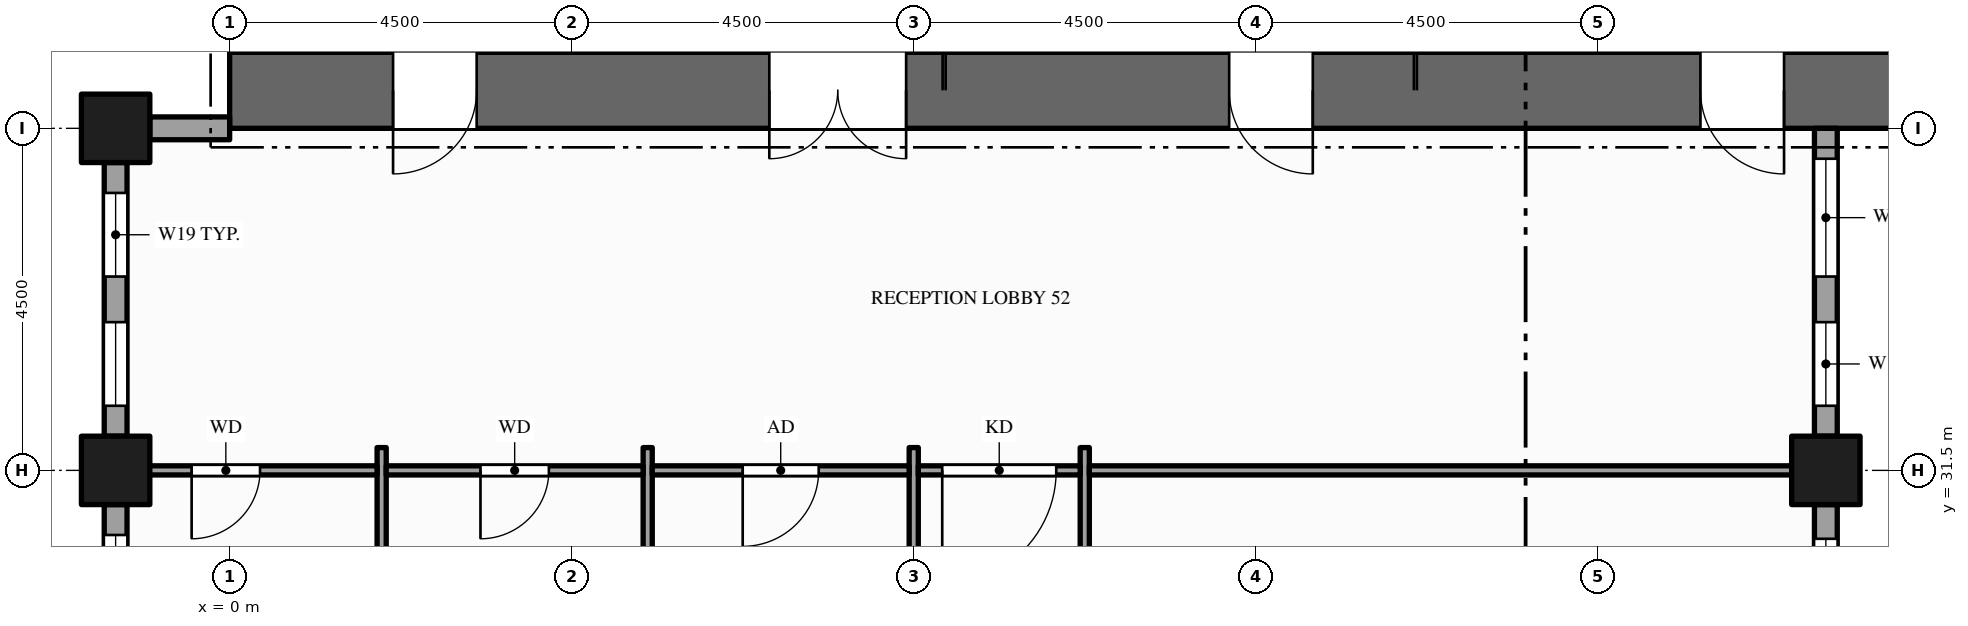
"""IFC4 building model, lengths in metres.
Left out: names, types, materials, properties, quantities, classifications, styles, units other than length and angle.
Written with IfcOpenShell. Run it as: python <this file> out.ifc"""

import sys

from ifc_helpers import new_model, si_unit, direction, frame, frame_2d, origin, origin_2d, place, context, subcontext, project, spatial, rectangle, hollow_rectangle, extrude, element, fill, save


model = new_model("IFC4")
c1 = context("Model", 3, precision=1e-05, world=origin(), true_north=direction((0.0, 1.0)))
c2 = subcontext(c1, "Body", "Model", "MODEL_VIEW")
j1 = project(units=[si_unit("LENGTHUNIT", "METRE"), si_unit("PLANEANGLEUNIT", "RADIAN")], contexts=[c1])
p1 = place(None, origin())
s1 = spatial("IfcSite", under=j1, at=p1, CompositionType="ELEMENT")
p2 = place(p1, origin())
s2 = spatial("IfcBuilding", under=s1, at=p2, CompositionType="ELEMENT")
p3 = place(p2, frame((0.0, 0.0, 139.0)))
s3 = spatial("IfcBuildingStorey", under=s2, at=p3, CompositionType="ELEMENT", Elevation=139.0)
p4 = place(p3, frame((0.0, 36.5, -0.15), z_axis=(0.0, 0.0, 1.0), x_axis=(1.0, 0.0, 0.0)))
e1 = element("IfcWall", 1, at=p4, inside=s3, PredefinedType="SHEAR", context=c2, shape_type="SweptSolid", body=[
    extrude(rectangle(XDim=22.5, YDim=1.0, at=frame_2d((11.25, 0.0))), origin(), (0.0, 0.0, 1.0), 4.0),
])
p5 = place(p4, frame((7.1, 0.0, 0.15)))
e2 = element("IfcOpeningElement", 2, at=p5, cuts=e1, PredefinedType="OPENING", context=c2, shape_type="SweptSolid", body=[
    extrude(rectangle(XDim=1.8, YDim=2.1, at=frame_2d((0.9, 1.05))), frame((0.0, 0.51, 0.0), z_axis=(0.0, -1.0, 0.0), x_axis=(1.0, 0.0, 0.0)), (0.0, 0.0, 1.0), 1.02),
])
p6 = place(p4, frame((13.15, 0.0, 0.15)))
e3 = element("IfcOpeningElement", 3, at=p6, cuts=e1, PredefinedType="OPENING", context=c2, shape_type="SweptSolid", body=[
    extrude(rectangle(XDim=1.1, YDim=2.1, at=frame_2d((0.55, 1.05))), frame((0.0, 0.51, 0.0), z_axis=(0.0, -1.0, 0.0), x_axis=(1.0, 0.0, 0.0)), (0.0, 0.0, 1.0), 1.02),
])
p7 = place(p4, frame((2.15, 0.0, 0.15)))
e4 = element("IfcOpeningElement", 4, at=p7, cuts=e1, PredefinedType="OPENING", context=c2, shape_type="SweptSolid", body=[
    extrude(rectangle(XDim=1.1, YDim=2.1, at=frame_2d((0.55, 1.05))), frame((0.0, 0.51, 0.0), z_axis=(0.0, -1.0, 0.0), x_axis=(1.0, 0.0, 0.0)), (0.0, 0.0, 1.0), 1.02),
])
p8 = place(p4, frame((19.35, 0.0, 0.15)))
e5 = element("IfcOpeningElement", 5, at=p8, cuts=e1, PredefinedType="OPENING", context=c2, shape_type="SweptSolid", body=[
    extrude(rectangle(XDim=1.1, YDim=2.1, at=frame_2d((0.55, 1.05))), frame((0.0, 0.51, 0.0), z_axis=(0.0, -1.0, 0.0), x_axis=(1.0, 0.0, 0.0)), (0.0, 0.0, 1.0), 1.02),
])
for number, where, z_axis, x_axis in (
    (6, (-1.5, 31.5, -0.15), (0.0, 0.0, 1.0), (1.0, 0.0, 0.0)),
    (7, (-1.5, 36.0, -0.15), (0.0, 0.0, 1.0), (1.0, 0.0, 0.0)),
    (8, (21.0, 31.5, -0.15), (0.0, 0.0, 1.0), (1.0, 0.0, 0.0)),
):
    element("IfcColumn", number, at=place(p3, frame(where, z_axis=z_axis, x_axis=x_axis)), inside=s3, PredefinedType="COLUMN", context=c2, shape_type="SweptSolid", body=[
        extrude(hollow_rectangle(XDim=0.9, YDim=0.9, WallThickness=0.045, at=origin_2d()), origin(), (0.0, 0.0, 1.0), 4.0),
    ])
p9 = place(p3, frame((21.0, 28.95, 0.0), z_axis=(0.0, 0.0, 1.0), x_axis=(0.0, 1.0, 0.0)))
e9 = element("IfcWall", 9, at=p9, inside=s3, PredefinedType="STANDARD", context=c2, shape_type="SweptSolid", body=[
    extrude(rectangle(XDim=2.1, YDim=0.3, at=frame_2d((1.05, 0.0))), origin(), (0.0, 0.0, 1.0), 3.149),
])
p10 = place(p9, frame((0.45, 0.0, 0.9)))
e10 = element("IfcOpeningElement", 10, at=p10, cuts=e9, PredefinedType="OPENING", context=c2, shape_type="SweptSolid", body=[
    extrude(rectangle(XDim=1.2, YDim=2.0, at=frame_2d((0.6, 1.0))), frame((0.0, 0.16, 0.0), z_axis=(0.0, -1.0, 0.0), x_axis=(1.0, 0.0, 0.0)), (0.0, 0.0, 1.0), 0.32),
])
p11 = place(p3, frame((21.0, 31.95, 0.0), z_axis=(0.0, 0.0, 1.0), x_axis=(0.0, 1.0, 0.0)))
e11 = element("IfcWall", 11, at=p11, inside=s3, PredefinedType="STANDARD", context=c2, shape_type="SweptSolid", body=[
    extrude(rectangle(XDim=4.05, YDim=0.3, at=frame_2d((2.025, 0.0))), origin(), (0.0, 0.0, 1.0), 3.149),
])
p12 = place(p11, frame((0.4, 0.0, 0.9)))
e12 = element("IfcOpeningElement", 12, at=p12, cuts=e11, PredefinedType="OPENING", context=c2, shape_type="SweptSolid", body=[
    extrude(rectangle(XDim=1.1, YDim=2.0, at=frame_2d((0.55, 1.0))), frame((0.0, 0.16, 0.0), z_axis=(0.0, -1.0, 0.0), x_axis=(1.0, 0.0, 0.0)), (0.0, 0.0, 1.0), 0.32),
])
p13 = place(p11, frame((2.1, 0.0, 0.9)))
e13 = element("IfcOpeningElement", 13, at=p13, cuts=e11, PredefinedType="OPENING", context=c2, shape_type="SweptSolid", body=[
    extrude(rectangle(XDim=1.55, YDim=2.0, at=frame_2d((0.775, 1.0))), frame((0.0, 0.16, 0.0), z_axis=(0.0, -1.0, 0.0), x_axis=(1.0, 0.0, 0.0)), (0.0, 0.0, 1.0), 0.32),
])
p14 = place(p3, frame((0.0, 36.0, 0.0), z_axis=(0.0, 0.0, 1.0), x_axis=(-1.0, 0.0, 0.0)))
e14 = element("IfcWall", 14, at=p14, inside=s3, PredefinedType="STANDARD", context=c2, shape_type="SweptSolid", body=[
    extrude(rectangle(XDim=1.05, YDim=0.3, at=frame_2d((0.525, 0.0))), origin(), (0.0, 0.0, 1.0), 2.87),
])
p15 = place(p3, frame((-1.5, 35.55, 0.0), z_axis=(0.0, 0.0, 1.0), x_axis=(0.0, -1.0, 0.0)))
e15 = element("IfcWall", 15, at=p15, inside=s3, PredefinedType="STANDARD", context=c2, shape_type="SweptSolid", body=[
    extrude(rectangle(XDim=3.6, YDim=0.3, at=frame_2d((1.8, 0.0))), origin(), (0.0, 0.0, 1.0), 3.149),
])
p16 = place(p15, frame((0.4, 0.0, 0.9)))
e16 = element("IfcOpeningElement", 16, at=p16, cuts=e15, PredefinedType="OPENING", context=c2, shape_type="SweptSolid", body=[
    extrude(rectangle(XDim=1.1, YDim=2.0, at=frame_2d((0.55, 1.0))), frame((0.0, 0.16, 0.0), z_axis=(0.0, -1.0, 0.0), x_axis=(1.0, 0.0, 0.0)), (0.0, 0.0, 1.0), 0.32),
])
p17 = place(p15, frame((2.1, 0.0, 0.9)))
e17 = element("IfcOpeningElement", 17, at=p17, cuts=e15, PredefinedType="OPENING", context=c2, shape_type="SweptSolid", body=[
    extrude(rectangle(XDim=1.1, YDim=2.0, at=frame_2d((0.55, 1.0))), frame((0.0, 0.16, 0.0), z_axis=(0.0, -1.0, 0.0), x_axis=(1.0, 0.0, 0.0)), (0.0, 0.0, 1.0), 0.32),
])
p18 = place(p3, frame((-1.5, 31.05, 0.0), z_axis=(0.0, 0.0, 1.0), x_axis=(0.0, -1.0, 0.0)))
e18 = element("IfcWall", 18, at=p18, inside=s3, PredefinedType="STANDARD", context=c2, shape_type="SweptSolid", body=[
    extrude(rectangle(XDim=3.6, YDim=0.3, at=frame_2d((1.8, 0.0))), origin(), (0.0, 0.0, 1.0), 3.149),
])
p19 = place(p18, frame((0.4, 0.0, 0.9)))
e19 = element("IfcOpeningElement", 19, at=p19, cuts=e18, PredefinedType="OPENING", context=c2, shape_type="SweptSolid", body=[
    extrude(rectangle(XDim=1.1, YDim=2.0, at=frame_2d((0.55, 1.0))), frame((0.0, 0.16, 0.0), z_axis=(0.0, -1.0, 0.0), x_axis=(1.0, 0.0, 0.0)), (0.0, 0.0, 1.0), 0.32),
])
p20 = place(p18, frame((2.1, 0.0, 0.9)))
e20 = element("IfcOpeningElement", 20, at=p20, cuts=e18, PredefinedType="OPENING", context=c2, shape_type="SweptSolid", body=[
    extrude(rectangle(XDim=1.1, YDim=2.0, at=frame_2d((0.55, 1.0))), frame((0.0, 0.16, 0.0), z_axis=(0.0, -1.0, 0.0), x_axis=(1.0, 0.0, 0.0)), (0.0, 0.0, 1.0), 0.32),
])
for number, where, z_axis, x_axis in (
    (21, (2.0, 26.7, 0.0), (0.0, 0.0, 1.0), (0.0, 1.0, 0.0)),
    (22, (5.5, 26.7, 0.0), (0.0, 0.0, 1.0), (0.0, 1.0, 0.0)),
):
    element("IfcWall", number, at=place(p3, frame(where, z_axis=z_axis, x_axis=x_axis)), inside=s3, PredefinedType="PARTITIONING", context=c2, shape_type="SweptSolid", body=[
        extrude(rectangle(XDim=5.1, YDim=0.12, at=frame_2d((2.55, 0.0))), origin(), (0.0, 0.0, 1.0), 3.85),
    ])
p21 = place(p3, frame((9.0, 10.95, 0.0), z_axis=(0.0, 0.0, 1.0), x_axis=(0.0, 1.0, 0.0)))
e23 = element("IfcWall", 23, at=p21, inside=s3, PredefinedType="PARTITIONING", context=c2, shape_type="SweptSolid", body=[
    extrude(rectangle(XDim=20.85, YDim=0.12, at=frame_2d((10.425, 0.0))), origin(), (0.0, 0.0, 1.0), 2.6),
])
p22 = place(p21, frame((2.05, 0.0, 0.0)))
e24 = element("IfcOpeningElement", 24, at=p22, cuts=e23, PredefinedType="OPENING", context=c2, shape_type="SweptSolid", body=[
    extrude(rectangle(XDim=1.0, YDim=2.1, at=frame_2d((0.5, 1.05))), frame((0.0, 0.07, 0.0), z_axis=(0.0, -1.0, 0.0), x_axis=(1.0, 0.0, 0.0)), (0.0, 0.0, 1.0), 0.14),
])
p23 = place(p21, frame((6.55, 0.0, 0.0)))
e25 = element("IfcOpeningElement", 25, at=p23, cuts=e23, PredefinedType="OPENING", context=c2, shape_type="SweptSolid", body=[
    extrude(rectangle(XDim=1.0, YDim=2.1, at=frame_2d((0.5, 1.05))), frame((0.0, 0.07, 0.0), z_axis=(0.0, -1.0, 0.0), x_axis=(1.0, 0.0, 0.0)), (0.0, 0.0, 1.0), 0.14),
])
p24 = place(p21, frame((11.805, 0.0, 0.0)))
e26 = element("IfcOpeningElement", 26, at=p24, cuts=e23, PredefinedType="OPENING", context=c2, shape_type="SweptSolid", body=[
    extrude(rectangle(XDim=1.8, YDim=2.1, at=frame_2d((0.9, 1.05))), frame((0.0, 0.07, 0.0), z_axis=(0.0, -1.0, 0.0), x_axis=(1.0, 0.0, 0.0)), (0.0, 0.0, 1.0), 0.14),
])
p25 = place(p3, frame((11.25, 10.95, 0.0), z_axis=(0.0, 0.0, 1.0), x_axis=(0.0, 1.0, 0.0)))
e27 = element("IfcWall", 27, at=p25, inside=s3, PredefinedType="PARTITIONING", context=c2, shape_type="SweptSolid", body=[
    extrude(rectangle(XDim=20.85, YDim=0.12, at=frame_2d((10.425, 0.0))), origin(), (0.0, 0.0, 1.0), 2.6),
])
p26 = place(p25, frame((17.8, 0.0, 0.0)))
e28 = element("IfcOpeningElement", 28, at=p26, cuts=e27, PredefinedType="OPENING", context=c2, shape_type="SweptSolid", body=[
    extrude(rectangle(XDim=1.0, YDim=2.1, at=frame_2d((0.5, 1.05))), frame((0.0, 0.07, 0.0), z_axis=(0.0, -1.0, 0.0), x_axis=(1.0, 0.0, 0.0)), (0.0, 0.0, 1.0), 0.14),
])
p27 = place(p25, frame((4.2, 0.0, 0.0)))
e29 = element("IfcOpeningElement", 29, at=p27, cuts=e27, PredefinedType="OPENING", context=c2, shape_type="SweptSolid", body=[
    extrude(rectangle(XDim=1.2, YDim=2.1, at=frame_2d((0.6, 1.05))), frame((0.0, 0.07, 0.0), z_axis=(0.0, -1.0, 0.0), x_axis=(1.0, 0.0, 0.0)), (0.0, 0.0, 1.0), 0.14),
])
p28 = place(p3, frame((-1.35, 31.5, 0.0), z_axis=(0.0, 0.0, 1.0), x_axis=(1.0, 0.0, 0.0)))
e30 = element("IfcWall", 30, at=p28, inside=s3, PredefinedType="PARTITIONING", context=c2, shape_type="SweptSolid", body=[
    extrude(rectangle(XDim=3.29, YDim=0.12, at=frame_2d((1.645, 0.0))), origin(), (0.0, 0.0, 1.0), 2.87),
])
p29 = place(p28, frame((0.85, 0.0, 0.0)))
e31 = element("IfcOpeningElement", 31, at=p29, cuts=e30, PredefinedType="OPENING", context=c2, shape_type="SweptSolid", body=[
    extrude(rectangle(XDim=0.9, YDim=2.1, at=frame_2d((0.45, 1.05))), frame((0.0, 0.07, 0.0), z_axis=(0.0, -1.0, 0.0), x_axis=(1.0, 0.0, 0.0)), (0.0, 0.0, 1.0), 0.14),
])
p30 = place(p3, frame((2.06, 31.5, 0.0), z_axis=(0.0, 0.0, 1.0), x_axis=(1.0, 0.0, 0.0)))
e32 = element("IfcWall", 32, at=p30, inside=s3, PredefinedType="PARTITIONING", context=c2, shape_type="SweptSolid", body=[
    extrude(rectangle(XDim=3.38, YDim=0.12, at=frame_2d((1.69, 0.0))), origin(), (0.0, 0.0, 1.0), 2.87),
])
p31 = place(p30, frame((1.24, 0.0, 0.0)))
e33 = element("IfcOpeningElement", 33, at=p31, cuts=e32, PredefinedType="OPENING", context=c2, shape_type="SweptSolid", body=[
    extrude(rectangle(XDim=0.9, YDim=2.1, at=frame_2d((0.45, 1.05))), frame((0.0, 0.07, 0.0), z_axis=(0.0, -1.0, 0.0), x_axis=(1.0, 0.0, 0.0)), (0.0, 0.0, 1.0), 0.14),
])
p32 = place(p3, frame((5.56, 31.5, 0.0), z_axis=(0.0, 0.0, 1.0), x_axis=(1.0, 0.0, 0.0)))
e34 = element("IfcWall", 34, at=p32, inside=s3, PredefinedType="PARTITIONING", context=c2, shape_type="SweptSolid", body=[
    extrude(rectangle(XDim=3.38, YDim=0.12, at=frame_2d((1.69, 0.0))), origin(), (0.0, 0.0, 1.0), 2.87),
])
p33 = place(p32, frame((1.19, 0.0, 0.0)))
e35 = element("IfcOpeningElement", 35, at=p33, cuts=e34, PredefinedType="OPENING", context=c2, shape_type="SweptSolid", body=[
    extrude(rectangle(XDim=1.0, YDim=2.1, at=frame_2d((0.5, 1.05))), frame((0.0, 0.07, 0.0), z_axis=(0.0, -1.0, 0.0), x_axis=(1.0, 0.0, 0.0)), (0.0, 0.0, 1.0), 0.14),
])
p34 = place(p3, frame((9.06, 31.5, 0.0), z_axis=(0.0, 0.0, 1.0), x_axis=(1.0, 0.0, 0.0)))
e36 = element("IfcWall", 36, at=p34, inside=s3, PredefinedType="PARTITIONING", context=c2, shape_type="SweptSolid", body=[
    extrude(rectangle(XDim=2.13, YDim=0.12, at=frame_2d((1.065, 0.0))), origin(), (0.0, 0.0, 1.0), 2.87),
])
p35 = place(p34, frame((0.315, 0.0, 0.0)))
e37 = element("IfcOpeningElement", 37, at=p35, cuts=e36, PredefinedType="OPENING", context=c2, shape_type="SweptSolid", body=[
    extrude(rectangle(XDim=1.5, YDim=2.1, at=frame_2d((0.75, 1.05))), frame((0.0, 0.07, 0.0), z_axis=(0.0, -1.0, 0.0), x_axis=(1.0, 0.0, 0.0)), (0.0, 0.0, 1.0), 0.14),
])
p36 = place(p3, frame((11.31, 31.5, 0.0), z_axis=(0.0, 0.0, 1.0), x_axis=(1.0, 0.0, 0.0)))
e38 = element("IfcWall", 38, at=p36, inside=s3, PredefinedType="PARTITIONING", context=c2, shape_type="SweptSolid", body=[
    extrude(rectangle(XDim=9.54, YDim=0.12, at=frame_2d((4.77, 0.0))), origin(), (0.0, 0.0, 1.0), 2.87),
])
p37 = place(p10, origin())
e39 = element("IfcWindow", 39, at=p37, inside=s3, PartitioningType="SINGLE_PANEL", PredefinedType="WINDOW", context=c2, shape_type="SweptSolid", body=[
    extrude(rectangle(XDim=1.2, YDim=2.0, at=frame_2d((0.6, 1.0))), frame((0.0, 0.03, 0.0), z_axis=(0.0, -1.0, 0.0), x_axis=(1.0, 0.0, 0.0)), (0.0, 0.0, 1.0), 0.06),
])
fill(e10, e39)
p38 = place(p12, origin())
e40 = element("IfcWindow", 40, at=p38, inside=s3, PartitioningType="SINGLE_PANEL", PredefinedType="WINDOW", context=c2, shape_type="SweptSolid", body=[
    extrude(rectangle(XDim=1.1, YDim=2.0, at=frame_2d((0.55, 1.0))), frame((0.0, 0.03, 0.0), z_axis=(0.0, -1.0, 0.0), x_axis=(1.0, 0.0, 0.0)), (0.0, 0.0, 1.0), 0.06),
])
fill(e12, e40)
p39 = place(p13, origin())
e41 = element("IfcWindow", 41, at=p39, inside=s3, PartitioningType="SINGLE_PANEL", PredefinedType="WINDOW", context=c2, shape_type="SweptSolid", body=[
    extrude(rectangle(XDim=1.55, YDim=2.0, at=frame_2d((0.775, 1.0))), frame((0.0, 0.03, 0.0), z_axis=(0.0, -1.0, 0.0), x_axis=(1.0, 0.0, 0.0)), (0.0, 0.0, 1.0), 0.06),
])
fill(e13, e41)
p40 = place(p16, origin())
e42 = element("IfcWindow", 42, at=p40, inside=s3, PartitioningType="SINGLE_PANEL", PredefinedType="WINDOW", context=c2, shape_type="SweptSolid", body=[
    extrude(rectangle(XDim=1.1, YDim=2.0, at=frame_2d((0.55, 1.0))), frame((0.0, 0.03, 0.0), z_axis=(0.0, -1.0, 0.0), x_axis=(1.0, 0.0, 0.0)), (0.0, 0.0, 1.0), 0.06),
])
fill(e16, e42)
p41 = place(p17, origin())
e43 = element("IfcWindow", 43, at=p41, inside=s3, PartitioningType="SINGLE_PANEL", PredefinedType="WINDOW", context=c2, shape_type="SweptSolid", body=[
    extrude(rectangle(XDim=1.1, YDim=2.0, at=frame_2d((0.55, 1.0))), frame((0.0, 0.03, 0.0), z_axis=(0.0, -1.0, 0.0), x_axis=(1.0, 0.0, 0.0)), (0.0, 0.0, 1.0), 0.06),
])
fill(e17, e43)
p42 = place(p19, origin())
e44 = element("IfcWindow", 44, at=p42, inside=s3, PartitioningType="SINGLE_PANEL", PredefinedType="WINDOW", context=c2, shape_type="SweptSolid", body=[
    extrude(rectangle(XDim=1.1, YDim=2.0, at=frame_2d((0.55, 1.0))), frame((0.0, 0.03, 0.0), z_axis=(0.0, -1.0, 0.0), x_axis=(1.0, 0.0, 0.0)), (0.0, 0.0, 1.0), 0.06),
])
fill(e19, e44)
p43 = place(p5, origin())
e45 = element("IfcDoor", 45, at=p43, inside=s3, OperationType="DOUBLE_DOOR_SINGLE_SWING", PredefinedType="DOOR", context=c2, shape_type="SweptSolid", body=[
    extrude(rectangle(XDim=1.8, YDim=2.1, at=frame_2d((0.9, 1.05))), frame((0.0, 0.025, 0.0), z_axis=(0.0, -1.0, 0.0), x_axis=(1.0, 0.0, 0.0)), (0.0, 0.0, 1.0), 0.05),
])
fill(e2, e45)
p44 = place(p6, origin())
e46 = element("IfcDoor", 46, at=p44, inside=s3, OperationType="SINGLE_SWING_RIGHT", PredefinedType="DOOR", context=c2, shape_type="SweptSolid", body=[
    extrude(rectangle(XDim=1.1, YDim=2.1, at=frame_2d((0.55, 1.05))), frame((0.0, 0.025, 0.0), z_axis=(0.0, -1.0, 0.0), x_axis=(1.0, 0.0, 0.0)), (0.0, 0.0, 1.0), 0.05),
])
fill(e3, e46)
p45 = place(p7, origin())
e47 = element("IfcDoor", 47, at=p45, inside=s3, OperationType="SINGLE_SWING_LEFT", PredefinedType="DOOR", context=c2, shape_type="SweptSolid", body=[
    extrude(rectangle(XDim=1.1, YDim=2.1, at=frame_2d((0.55, 1.05))), frame((0.0, 0.025, 0.0), z_axis=(0.0, -1.0, 0.0), x_axis=(1.0, 0.0, 0.0)), (0.0, 0.0, 1.0), 0.05),
])
fill(e4, e47)
p46 = place(p8, origin())
e48 = element("IfcDoor", 48, at=p46, inside=s3, OperationType="SINGLE_SWING_RIGHT", PredefinedType="DOOR", context=c2, shape_type="SweptSolid", body=[
    extrude(rectangle(XDim=1.1, YDim=2.1, at=frame_2d((0.55, 1.05))), frame((0.0, 0.025, 0.0), z_axis=(0.0, -1.0, 0.0), x_axis=(1.0, 0.0, 0.0)), (0.0, 0.0, 1.0), 0.05),
])
fill(e5, e48)
p47 = place(p35, origin())
e49 = element("IfcDoor", 49, at=p47, inside=s3, OperationType="SINGLE_SWING_LEFT", PredefinedType="DOOR", context=c2, shape_type="SweptSolid", body=[
    extrude(rectangle(XDim=1.5, YDim=2.1, at=frame_2d((0.75, 1.05))), frame((0.0, 0.025, 0.0), z_axis=(0.0, -1.0, 0.0), x_axis=(1.0, 0.0, 0.0)), (0.0, 0.0, 1.0), 0.05),
])
fill(e37, e49)
p48 = place(p29, origin())
e50 = element("IfcDoor", 50, at=p48, inside=s3, OperationType="SINGLE_SWING_LEFT", PredefinedType="DOOR", context=c2, shape_type="SweptSolid", body=[
    extrude(rectangle(XDim=0.9, YDim=2.1, at=frame_2d((0.45, 1.05))), frame((0.0, 0.025, 0.0), z_axis=(0.0, -1.0, 0.0), x_axis=(1.0, 0.0, 0.0)), (0.0, 0.0, 1.0), 0.05),
])
fill(e31, e50)
p49 = place(p31, origin())
e51 = element("IfcDoor", 51, at=p49, inside=s3, OperationType="SINGLE_SWING_LEFT", PredefinedType="DOOR", context=c2, shape_type="SweptSolid", body=[
    extrude(rectangle(XDim=0.9, YDim=2.1, at=frame_2d((0.45, 1.05))), frame((0.0, 0.025, 0.0), z_axis=(0.0, -1.0, 0.0), x_axis=(1.0, 0.0, 0.0)), (0.0, 0.0, 1.0), 0.05),
])
fill(e33, e51)
p50 = place(p33, origin())
e52 = element("IfcDoor", 52, at=p50, inside=s3, OperationType="SINGLE_SWING_LEFT", PredefinedType="DOOR", context=c2, shape_type="SweptSolid", body=[
    extrude(rectangle(XDim=1.0, YDim=2.1, at=frame_2d((0.5, 1.05))), frame((0.0, 0.025, 0.0), z_axis=(0.0, -1.0, 0.0), x_axis=(1.0, 0.0, 0.0)), (0.0, 0.0, 1.0), 0.05),
])
fill(e35, e52)
save(model, sys.argv[1])
